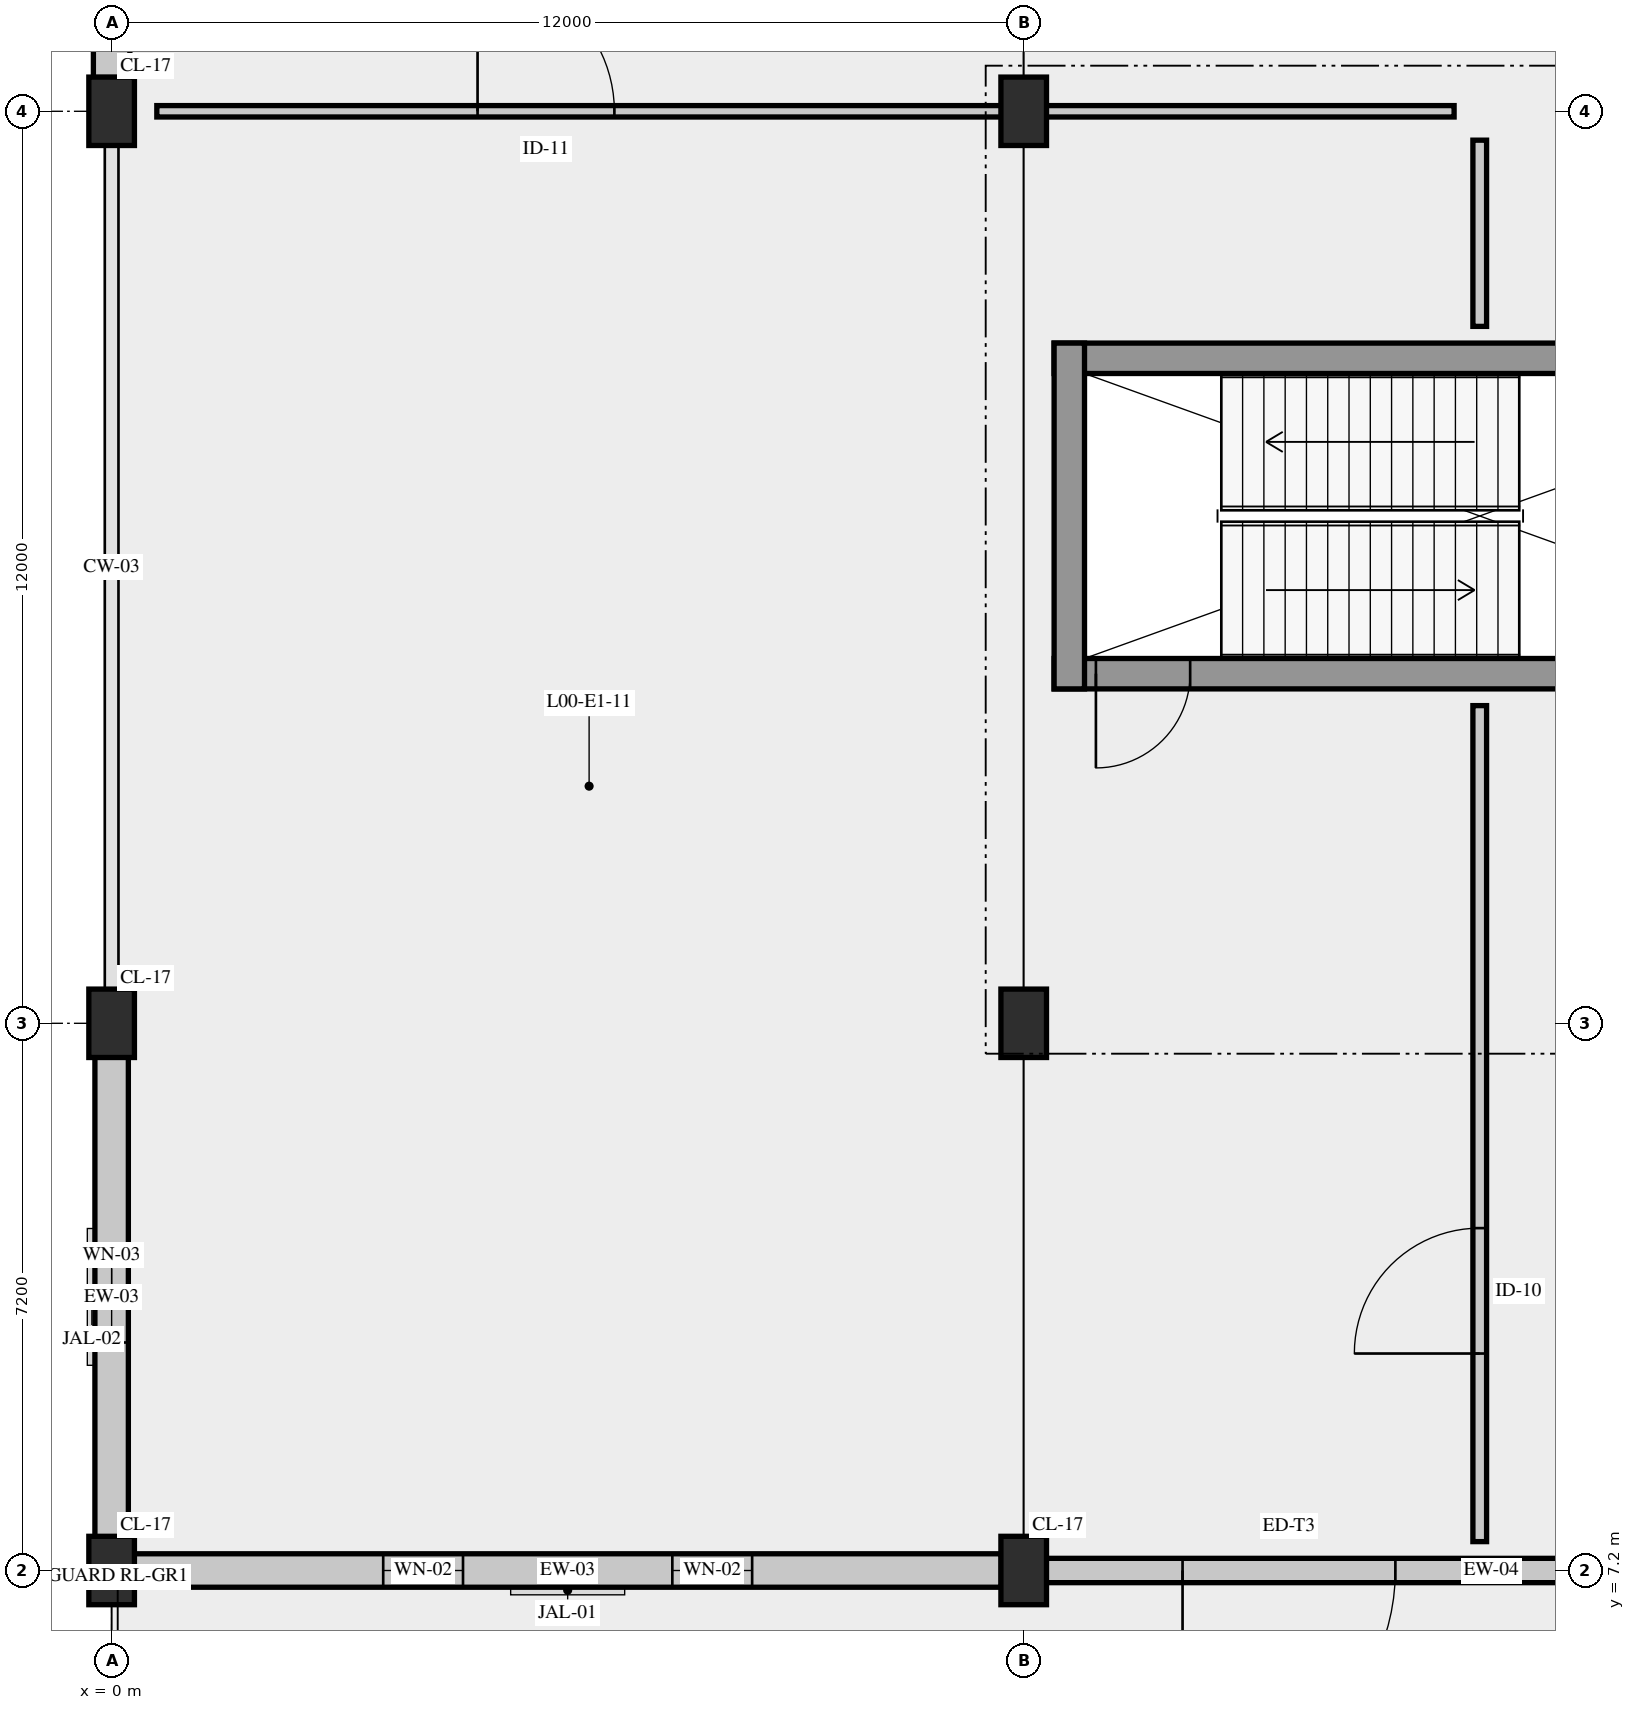
"""IFC4 building model, lengths in metres.
Left out: names, types, materials, properties, quantities, classifications, styles, units other than length and angle.
Written with IfcOpenShell. Run it as: python <this file> out.ifc"""

import sys

from ifc_helpers import new_model, si_unit, direction, frame, frame_2d, origin, origin_2d, place, context, subcontext, project, spatial, rectangle, extrude, element, fill, save


model = new_model("IFC4")
c1 = context("Model", 3, precision=1e-05, world=origin(), true_north=direction((0.0, 1.0)))
c2 = subcontext(c1, "Body", "Model", "MODEL_VIEW")
j1 = project(units=[si_unit("LENGTHUNIT", "METRE"), si_unit("PLANEANGLEUNIT", "RADIAN")], contexts=[c1])
p1 = place(None, origin())
s1 = spatial("IfcSite", under=j1, at=p1, CompositionType="ELEMENT")
p2 = place(p1, origin())
s2 = spatial("IfcBuilding", under=s1, at=p2, CompositionType="ELEMENT")
p3 = place(p2, origin())
s3 = spatial("IfcBuildingStorey", under=s2, at=p3, CompositionType="ELEMENT", Elevation=0.0)
for number, where, z_axis, x_axis in (
    (1, (0.0, 7.2, 0.0), (0.0, 0.0, 1.0), (1.0, 0.0, 0.0)),
    (2, (0.0, 14.4, 0.0), (0.0, 0.0, 1.0), (1.0, 0.0, 0.0)),
    (3, (0.0, 26.4, 0.0), (0.0, 0.0, 1.0), (1.0, 0.0, 0.0)),
    (4, (12.0, 7.2, 0.0), (0.0, 0.0, 1.0), (1.0, 0.0, 0.0)),
    (5, (12.0, 14.4, 0.0), (0.0, 0.0, 1.0), (1.0, 0.0, 0.0)),
    (6, (12.0, 26.4, 0.0), (0.0, 0.0, 1.0), (1.0, 0.0, 0.0)),
):
    element("IfcColumn", number, at=place(p3, frame(where, z_axis=z_axis, x_axis=x_axis)), inside=s3, PredefinedType="COLUMN", context=c2, shape_type="SweptSolid", body=[
        extrude(rectangle(XDim=0.6, YDim=0.9, at=origin_2d()), origin(), (0.0, 0.0, 1.0), 5.4),
    ])
p4 = place(p3, frame((0.295, 7.2, 0.0), z_axis=(0.0, 0.0, 1.0), x_axis=(1.0, 0.0, 0.0)))
e7 = element("IfcWall", 7, at=p4, inside=s3, PredefinedType="SOLIDWALL", context=c2, shape_type="SweptSolid", body=[
    extrude(rectangle(XDim=11.41, YDim=0.44, at=frame_2d((5.705, 0.0))), origin(), (0.0, 0.0, 1.0), 4.56),
])
p5 = place(p4, frame((3.278, 0.0, 0.95)))
e8 = element("IfcOpeningElement", 8, at=p5, cuts=e7, PredefinedType="OPENING", context=c2, shape_type="SweptSolid", body=[
    extrude(rectangle(XDim=1.05, YDim=1.5, at=frame_2d((0.525, 0.75))), frame((0.0, 0.23, 0.0), z_axis=(0.0, -1.0, 0.0), x_axis=(1.0, 0.0, 0.0)), (0.0, 0.0, 1.0), 0.46),
])
p6 = place(p4, frame((7.082, 0.0, 0.95)))
e9 = element("IfcOpeningElement", 9, at=p6, cuts=e7, PredefinedType="OPENING", context=c2, shape_type="SweptSolid", body=[
    extrude(rectangle(XDim=1.05, YDim=1.5, at=frame_2d((0.525, 0.75))), frame((0.0, 0.23, 0.0), z_axis=(0.0, -1.0, 0.0), x_axis=(1.0, 0.0, 0.0)), (0.0, 0.0, 1.0), 0.46),
])
p7 = place(p3, frame((0.0, 13.955, 0.0), z_axis=(0.0, 0.0, 1.0), x_axis=(0.0, -1.0, 0.0)))
e10 = element("IfcWall", 10, at=p7, inside=s3, PredefinedType="SOLIDWALL", context=c2, shape_type="SweptSolid", body=[
    extrude(rectangle(XDim=6.31, YDim=0.44, at=frame_2d((3.155, 0.0))), origin(), (0.0, 0.0, 1.0), 4.56),
])
p8 = place(p7, frame((2.555, 0.0, 0.95)))
e11 = element("IfcOpeningElement", 11, at=p8, cuts=e10, PredefinedType="OPENING", context=c2, shape_type="SweptSolid", body=[
    extrude(rectangle(XDim=1.2, YDim=1.5, at=frame_2d((0.6, 0.75))), frame((0.0, 0.23, 0.0), z_axis=(0.0, -1.0, 0.0), x_axis=(1.0, 0.0, 0.0)), (0.0, 0.0, 1.0), 0.46),
])
p9 = place(p3, frame((0.0, 38.4, 0.0), z_axis=(0.0, 0.0, 1.0), x_axis=(0.0, -1.0, 0.0)))
e12 = element("IfcWall", 12, at=p9, inside=s3, PredefinedType="SOLIDWALL", context=c2, shape_type="SweptSolid", body=[
    extrude(rectangle(XDim=11.555, YDim=0.48, at=frame_2d((5.777, 0.0))), origin(), (0.0, 0.0, 1.0), 4.21),
])
p10 = place(p3, frame((12.295, 7.2, 0.0), z_axis=(0.0, 0.0, 1.0), x_axis=(1.0, 0.0, 0.0)))
e13 = element("IfcWall", 13, at=p10, inside=s3, PredefinedType="SOLIDWALL", context=c2, shape_type="SweptSolid", body=[
    extrude(rectangle(XDim=11.41, YDim=0.32, at=frame_2d((5.705, 0.0))), origin(), (0.0, 0.0, 1.0), 4.56),
])
p11 = place(p10, frame((1.795, 0.0, 0.0)))
e14 = element("IfcOpeningElement", 14, at=p11, cuts=e13, PredefinedType="OPENING", context=c2, shape_type="SweptSolid", body=[
    extrude(rectangle(XDim=2.8, YDim=2.8, at=frame_2d((1.4, 1.4))), frame((0.0, 0.17, 0.0), z_axis=(0.0, -1.0, 0.0), x_axis=(1.0, 0.0, 0.0)), (0.0, 0.0, 1.0), 0.34),
])
p12 = place(p10, frame((7.015, 0.0, 0.0)))
e15 = element("IfcOpeningElement", 15, at=p12, cuts=e13, PredefinedType="OPENING", context=c2, shape_type="SweptSolid", body=[
    extrude(rectangle(XDim=2.4, YDim=2.6, at=frame_2d((1.2, 1.3))), frame((0.0, 0.17, 0.0), z_axis=(0.0, -1.0, 0.0), x_axis=(1.0, 0.0, 0.0)), (0.0, 0.0, 1.0), 0.34),
])
p13 = place(p3, frame((12.4, 19.0, 0.0), z_axis=(0.0, 0.0, 1.0), x_axis=(1.0, 0.0, 0.0)))
e16 = element("IfcWall", 16, at=p13, inside=s3, PredefinedType="SHEAR", context=c2, shape_type="SweptSolid", body=[
    extrude(rectangle(XDim=11.2, YDim=0.4, at=frame_2d((5.6, 0.0))), origin(), (0.0, 0.0, 1.0), 5.14),
])
p14 = place(p13, frame((0.55, 0.0, 0.0)))
e17 = element("IfcOpeningElement", 17, at=p14, cuts=e16, PredefinedType="OPENING", context=c2, shape_type="SweptSolid", body=[
    extrude(rectangle(XDim=1.24, YDim=2.25, at=frame_2d((0.62, 1.125))), frame((0.0, 0.21, 0.0), z_axis=(0.0, -1.0, 0.0), x_axis=(1.0, 0.0, 0.0)), (0.0, 0.0, 1.0), 0.42),
])
p15 = place(p3, frame((23.6, 23.15, 0.0), z_axis=(0.0, 0.0, 1.0), x_axis=(-1.0, 0.0, 0.0)))
e18 = element("IfcWall", 18, at=p15, inside=s3, PredefinedType="SHEAR", context=c2, shape_type="SweptSolid", body=[
    extrude(rectangle(XDim=11.2, YDim=0.4, at=frame_2d((5.6, 0.0))), origin(), (0.0, 0.0, 1.0), 5.14),
])
p16 = place(p3, frame((12.6, 23.35, 0.0), z_axis=(0.0, 0.0, 1.0), x_axis=(0.0, -1.0, 0.0)))
e19 = element("IfcWall", 19, at=p16, inside=s3, PredefinedType="SHEAR", context=c2, shape_type="SweptSolid", body=[
    extrude(rectangle(XDim=4.55, YDim=0.4, at=frame_2d((2.275, 0.0))), origin(), (0.0, 0.0, 1.0), 5.14),
])
p17 = place(p3, frame((18.0, 7.58, 0.0), z_axis=(0.0, 0.0, 1.0), x_axis=(0.0, 1.0, 0.0)))
e20 = element("IfcWall", 20, at=p17, inside=s3, PredefinedType="PARTITIONING", context=c2, shape_type="SweptSolid", body=[
    extrude(rectangle(XDim=11.0, YDim=0.18, at=frame_2d((5.5, 0.0))), origin(), (0.0, 0.0, 1.0), 4.57),
])
p18 = place(p17, frame((2.475, 0.0, 0.0)))
e21 = element("IfcOpeningElement", 21, at=p18, cuts=e20, PredefinedType="OPENING", context=c2, shape_type="SweptSolid", body=[
    extrude(rectangle(XDim=1.65, YDim=2.35, at=frame_2d((0.825, 1.175))), frame((0.0, 0.1, 0.0), z_axis=(0.0, -1.0, 0.0), x_axis=(1.0, 0.0, 0.0)), (0.0, 0.0, 1.0), 0.2),
])
p19 = place(p3, frame((18.0, 23.57, 0.0), z_axis=(0.0, 0.0, 1.0), x_axis=(0.0, 1.0, 0.0)))
e22 = element("IfcWall", 22, at=p19, inside=s3, PredefinedType="PARTITIONING", context=c2, shape_type="SweptSolid", body=[
    extrude(rectangle(XDim=2.45, YDim=0.18, at=frame_2d((1.225, 0.0))), origin(), (0.0, 0.0, 1.0), 5.12),
])
p20 = place(p3, frame((0.594, 26.4, 0.0), z_axis=(0.0, 0.0, 1.0), x_axis=(1.0, 0.0, 0.0)))
e23 = element("IfcWall", 23, at=p20, inside=s3, PredefinedType="PARTITIONING", context=c2, shape_type="SweptSolid", body=[
    extrude(rectangle(XDim=17.068, YDim=0.15, at=frame_2d((8.534, 0.0))), origin(), (0.0, 0.0, 1.0), 4.57),
])
p21 = place(p20, frame((4.22, 0.0, 0.0)))
e24 = element("IfcOpeningElement", 24, at=p21, cuts=e23, PredefinedType="OPENING", context=c2, shape_type="SweptSolid", body=[
    extrude(rectangle(XDim=1.8, YDim=2.4, at=frame_2d((0.9, 1.2))), frame((0.0, 0.085, 0.0), z_axis=(0.0, -1.0, 0.0), x_axis=(1.0, 0.0, 0.0)), (0.0, 0.0, 1.0), 0.17),
])
p22 = place(p5, origin())
e25 = element("IfcWindow", 25, at=p22, inside=s3, PartitioningType="SINGLE_PANEL", PredefinedType="WINDOW", context=c2, shape_type="SweptSolid", body=[
    extrude(rectangle(XDim=1.05, YDim=1.5, at=frame_2d((0.525, 0.75))), frame((0.0, 0.03, 0.0), z_axis=(0.0, -1.0, 0.0), x_axis=(1.0, 0.0, 0.0)), (0.0, 0.0, 1.0), 0.06),
])
fill(e8, e25)
p23 = place(p6, origin())
e26 = element("IfcWindow", 26, at=p23, inside=s3, PartitioningType="SINGLE_PANEL", PredefinedType="WINDOW", context=c2, shape_type="SweptSolid", body=[
    extrude(rectangle(XDim=1.05, YDim=1.5, at=frame_2d((0.525, 0.75))), frame((0.0, 0.03, 0.0), z_axis=(0.0, -1.0, 0.0), x_axis=(1.0, 0.0, 0.0)), (0.0, 0.0, 1.0), 0.06),
])
fill(e9, e26)
p24 = place(p8, origin())
e27 = element("IfcWindow", 27, at=p24, inside=s3, PartitioningType="SINGLE_PANEL", PredefinedType="WINDOW", context=c2, shape_type="SweptSolid", body=[
    extrude(rectangle(XDim=1.2, YDim=1.5, at=frame_2d((0.6, 0.75))), frame((0.0, 0.03, 0.0), z_axis=(0.0, -1.0, 0.0), x_axis=(1.0, 0.0, 0.0)), (0.0, 0.0, 1.0), 0.06),
])
fill(e11, e27)
p25 = place(p11, frame((2.8, 0.0, 0.0), z_axis=(0.0, 0.0, 1.0), x_axis=(-1.0, 0.0, 0.0)))
e28 = element("IfcDoor", 28, at=p25, inside=s3, OperationType="DOUBLE_DOOR_SINGLE_SWING", PredefinedType="DOOR", context=c2, shape_type="SweptSolid", body=[
    extrude(rectangle(XDim=2.8, YDim=2.8, at=frame_2d((1.4, 1.4))), frame((0.0, 0.025, 0.0), z_axis=(0.0, -1.0, 0.0), x_axis=(1.0, 0.0, 0.0)), (0.0, 0.0, 1.0), 0.05),
])
fill(e14, e28)
p26 = place(p14, frame((1.24, 0.0, 0.0), z_axis=(0.0, 0.0, 1.0), x_axis=(-1.0, 0.0, 0.0)))
e29 = element("IfcDoor", 29, at=p26, inside=s3, OperationType="SINGLE_SWING_LEFT", PredefinedType="DOOR", context=c2, shape_type="SweptSolid", body=[
    extrude(rectangle(XDim=1.24, YDim=2.25, at=frame_2d((0.62, 1.125))), frame((0.0, 0.025, 0.0), z_axis=(0.0, -1.0, 0.0), x_axis=(1.0, 0.0, 0.0)), (0.0, 0.0, 1.0), 0.05),
])
fill(e17, e29)
p27 = place(p18, origin())
e30 = element("IfcDoor", 30, at=p27, inside=s3, OperationType="DOUBLE_DOOR_SINGLE_SWING", PredefinedType="DOOR", context=c2, shape_type="SweptSolid", body=[
    extrude(rectangle(XDim=1.65, YDim=2.35, at=frame_2d((0.825, 1.175))), frame((0.0, 0.025, 0.0), z_axis=(0.0, -1.0, 0.0), x_axis=(1.0, 0.0, 0.0)), (0.0, 0.0, 1.0), 0.05),
])
fill(e21, e30)
p28 = place(p21, origin())
e31 = element("IfcDoor", 31, at=p28, inside=s3, OperationType="DOUBLE_DOOR_SINGLE_SWING", PredefinedType="DOOR", context=c2, shape_type="SweptSolid", body=[
    extrude(rectangle(XDim=1.8, YDim=2.4, at=frame_2d((0.9, 1.2))), frame((0.0, 0.025, 0.0), z_axis=(0.0, -1.0, 0.0), x_axis=(1.0, 0.0, 0.0)), (0.0, 0.0, 1.0), 0.05),
])
fill(e24, e31)
save(model, sys.argv[1])
